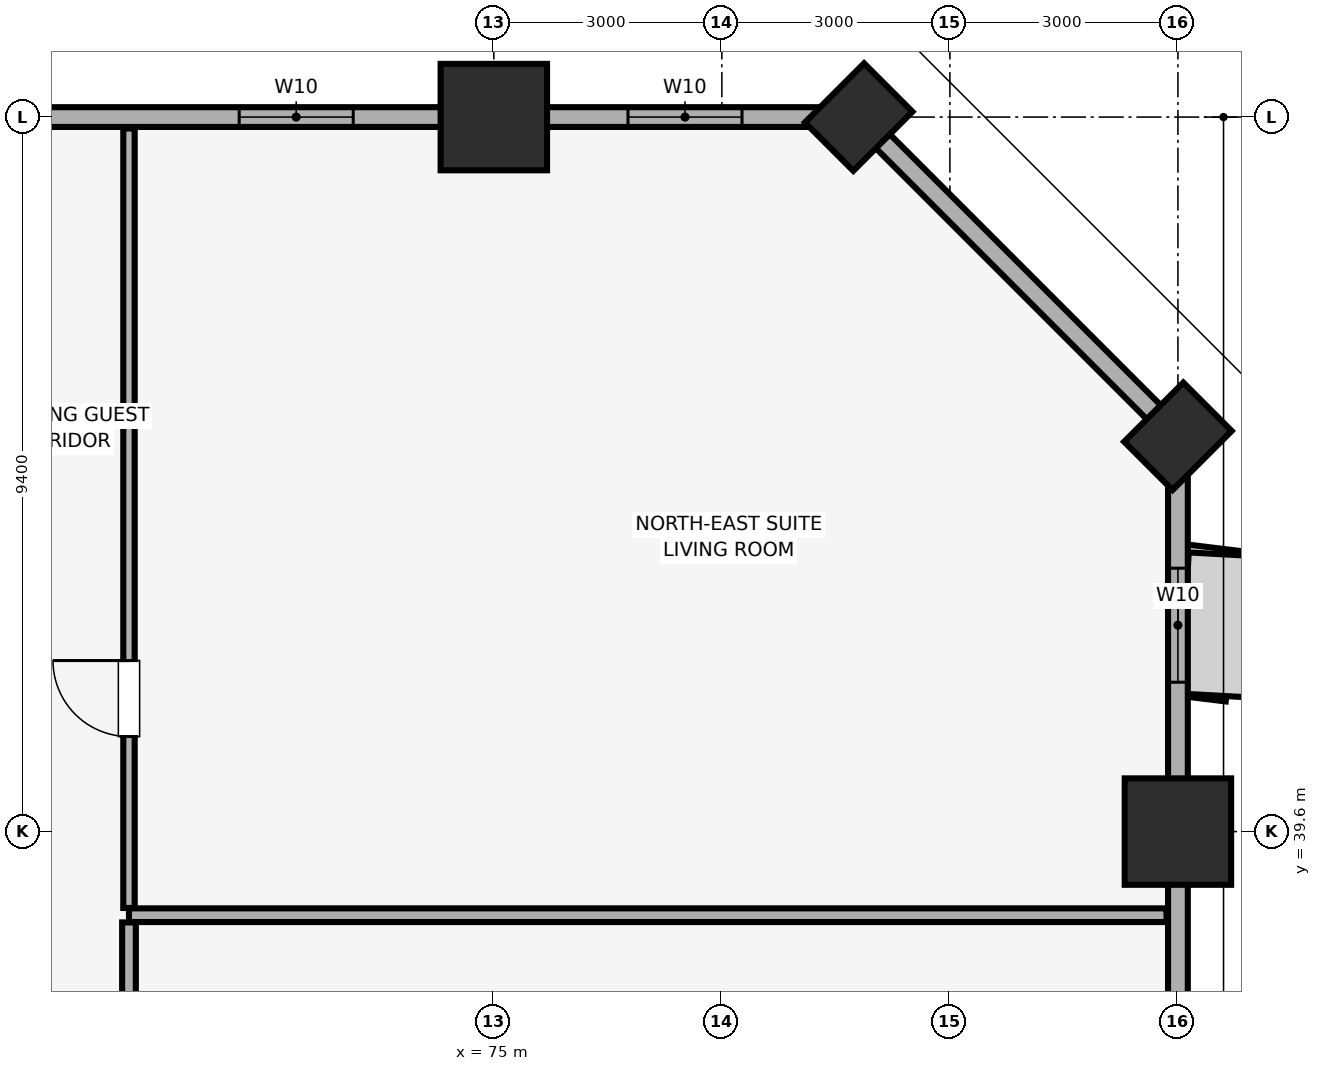
"""IFC4 building model, lengths in metres.
Left out: names, types, materials, properties, quantities, classifications, styles, units other than length and angle.
Written with IfcOpenShell. Run it as: python <this file> out.ifc"""

import sys

from ifc_helpers import new_model, si_unit, direction, frame, frame_2d, origin, origin_2d, place, context, subcontext, project, spatial, rectangle, extrude, element, fill, save


model = new_model("IFC4")
c1 = context("Model", 3, precision=1e-05, world=origin(), true_north=direction((0.0, 1.0)))
c2 = subcontext(c1, "Body", "Model", "MODEL_VIEW")
j1 = project(units=[si_unit("LENGTHUNIT", "METRE"), si_unit("PLANEANGLEUNIT", "RADIAN")], contexts=[c1])
p1 = place(None, origin())
s1 = spatial("IfcSite", under=j1, at=p1, CompositionType="ELEMENT")
p2 = place(p1, origin())
s2 = spatial("IfcBuilding", under=s1, at=p2, CompositionType="ELEMENT")
p3 = place(p2, frame((0.0, 0.0, 35.15)))
s3 = spatial("IfcBuildingStorey", under=s2, at=p3, CompositionType="ELEMENT", Elevation=35.15)
p4 = place(p3, frame((84.0, 39.6, 0.0), z_axis=(0.0, 0.0, 1.0), x_axis=(1.0, 0.0, 0.0)))
e1 = element("IfcColumn", 1, at=p4, inside=s3, PredefinedType="COLUMN", context=c2, shape_type="SweptSolid", body=[
    extrude(rectangle(XDim=1.4, YDim=1.4, at=origin_2d()), origin(), (0.0, 0.0, 1.0), 3.51),
])
for number, where, z_axis, x_axis in (
    (2, (84.0, 44.8, 0.0), (0.0, 0.0, 1.0), (0.707, 0.707, 0.0)),
    (3, (79.8, 49.0, 0.0), (0.0, 0.0, 1.0), (0.707, 0.707, 0.0)),
):
    element("IfcColumn", number, at=place(p3, frame(where, z_axis=z_axis, x_axis=x_axis)), inside=s3, PredefinedType="PILASTER", context=c2, shape_type="SweptSolid", body=[
        extrude(rectangle(XDim=1.1, YDim=0.9, at=origin_2d()), origin(), (0.0, 0.0, 1.0), 3.51),
    ])
p5 = place(p3, frame((75.0, 49.0, 0.0), z_axis=(0.0, 0.0, 1.0), x_axis=(1.0, 0.0, 0.0)))
e4 = element("IfcColumn", 4, at=p5, inside=s3, PredefinedType="COLUMN", context=c2, shape_type="SweptSolid", body=[
    extrude(rectangle(XDim=1.4, YDim=1.4, at=origin_2d()), origin(), (0.0, 0.0, 1.0), 3.51),
])
p6 = place(p3, frame((84.0, 4.2, 0.0), z_axis=(0.0, 0.0, 1.0), x_axis=(0.0, 1.0, 0.0)))
e5 = element("IfcWall", 5, at=p6, inside=s3, PredefinedType="SOLIDWALL", context=c2, shape_type="SweptSolid", body=[
    extrude(rectangle(XDim=40.6, YDim=0.26, at=frame_2d((20.3, 0.0))), origin(), (0.0, 0.0, 1.0), 2.56),
])
p7 = place(p6, frame((7.675, 0.0, 0.85)))
e6 = element("IfcOpeningElement", 6, at=p7, cuts=e5, PredefinedType="OPENING", context=c2, shape_type="SweptSolid", body=[
    extrude(rectangle(XDim=1.5, YDim=1.4, at=frame_2d((0.75, 0.7))), frame((0.0, 0.14, 0.0), z_axis=(0.0, -1.0, 0.0), x_axis=(1.0, 0.0, 0.0)), (0.0, 0.0, 1.0), 0.28),
])
p8 = place(p6, frame((12.76, 0.0, 0.85)))
e7 = element("IfcOpeningElement", 7, at=p8, cuts=e5, PredefinedType="OPENING", context=c2, shape_type="SweptSolid", body=[
    extrude(rectangle(XDim=1.5, YDim=1.4, at=frame_2d((0.75, 0.7))), frame((0.0, 0.14, 0.0), z_axis=(0.0, -1.0, 0.0), x_axis=(1.0, 0.0, 0.0)), (0.0, 0.0, 1.0), 0.28),
])
p9 = place(p6, frame((19.56, 0.0, 0.85)))
e8 = element("IfcOpeningElement", 8, at=p9, cuts=e5, PredefinedType="OPENING", context=c2, shape_type="SweptSolid", body=[
    extrude(rectangle(XDim=1.5, YDim=1.4, at=frame_2d((0.75, 0.7))), frame((0.0, 0.14, 0.0), z_axis=(0.0, -1.0, 0.0), x_axis=(1.0, 0.0, 0.0)), (0.0, 0.0, 1.0), 0.28),
])
p10 = place(p6, frame((29.2, 0.0, 0.85)))
e9 = element("IfcOpeningElement", 9, at=p10, cuts=e5, PredefinedType="OPENING", context=c2, shape_type="SweptSolid", body=[
    extrude(rectangle(XDim=1.5, YDim=1.4, at=frame_2d((0.75, 0.7))), frame((0.0, 0.14, 0.0), z_axis=(0.0, -1.0, 0.0), x_axis=(1.0, 0.0, 0.0)), (0.0, 0.0, 1.0), 0.28),
])
p11 = place(p6, frame((37.365, 0.0, 0.85)))
e10 = element("IfcOpeningElement", 10, at=p11, cuts=e5, PredefinedType="OPENING", context=c2, shape_type="SweptSolid", body=[
    extrude(rectangle(XDim=1.5, YDim=1.4, at=frame_2d((0.75, 0.7))), frame((0.0, 0.14, 0.0), z_axis=(0.0, -1.0, 0.0), x_axis=(1.0, 0.0, 0.0)), (0.0, 0.0, 1.0), 0.28),
])
p12 = place(p3, frame((84.0, 44.8, 0.0), z_axis=(0.0, 0.0, 1.0), x_axis=(-0.707106781187, 0.707106781187, 0.0)))
e11 = element("IfcWall", 11, at=p12, inside=s3, PredefinedType="SOLIDWALL", context=c2, shape_type="SweptSolid", body=[
    extrude(rectangle(XDim=5.94, YDim=0.26, at=frame_2d((2.97, 0.0))), origin(), (0.0, 0.0, 1.0), 2.56),
])
p13 = place(p3, frame((79.8, 49.0, 0.0), z_axis=(0.0, 0.0, 1.0), x_axis=(-1.0, 0.0, 0.0)))
e12 = element("IfcWall", 12, at=p13, inside=s3, PredefinedType="SOLIDWALL", context=c2, shape_type="SweptSolid", body=[
    extrude(rectangle(XDim=75.6, YDim=0.26, at=frame_2d((37.8, 0.0))), origin(), (0.0, 0.0, 1.0), 2.56),
])
p14 = place(p13, frame((72.565, 0.0, 0.85)))
e13 = element("IfcOpeningElement", 13, at=p14, cuts=e12, PredefinedType="OPENING", context=c2, shape_type="SweptSolid", body=[
    extrude(rectangle(XDim=1.5, YDim=1.4, at=frame_2d((0.75, 0.7))), frame((0.0, 0.14, 0.0), z_axis=(0.0, -1.0, 0.0), x_axis=(1.0, 0.0, 0.0)), (0.0, 0.0, 1.0), 0.28),
])
p15 = place(p13, frame((67.45, 0.0, 0.85)))
e14 = element("IfcOpeningElement", 14, at=p15, cuts=e12, PredefinedType="OPENING", context=c2, shape_type="SweptSolid", body=[
    extrude(rectangle(XDim=1.5, YDim=1.4, at=frame_2d((0.75, 0.7))), frame((0.0, 0.14, 0.0), z_axis=(0.0, -1.0, 0.0), x_axis=(1.0, 0.0, 0.0)), (0.0, 0.0, 1.0), 0.28),
])
p16 = place(p13, frame((6.65, 0.0, 0.85)))
e15 = element("IfcOpeningElement", 15, at=p16, cuts=e12, PredefinedType="OPENING", context=c2, shape_type="SweptSolid", body=[
    extrude(rectangle(XDim=1.5, YDim=1.4, at=frame_2d((0.75, 0.7))), frame((0.0, 0.14, 0.0), z_axis=(0.0, -1.0, 0.0), x_axis=(1.0, 0.0, 0.0)), (0.0, 0.0, 1.0), 0.28),
])
p17 = place(p13, frame((1.535, 0.0, 0.85)))
e16 = element("IfcOpeningElement", 16, at=p17, cuts=e12, PredefinedType="OPENING", context=c2, shape_type="SweptSolid", body=[
    extrude(rectangle(XDim=1.5, YDim=1.4, at=frame_2d((0.75, 0.7))), frame((0.0, 0.14, 0.0), z_axis=(0.0, -1.0, 0.0), x_axis=(1.0, 0.0, 0.0)), (0.0, 0.0, 1.0), 0.28),
])
p18 = place(p13, frame((51.365, 0.0, 0.9)))
e17 = element("IfcOpeningElement", 17, at=p18, cuts=e12, PredefinedType="OPENING", context=c2, shape_type="SweptSolid", body=[
    extrude(rectangle(XDim=1.5, YDim=1.4, at=frame_2d((0.75, 0.7))), frame((0.0, 0.14, 0.0), z_axis=(0.0, -1.0, 0.0), x_axis=(1.0, 0.0, 0.0)), (0.0, 0.0, 1.0), 0.28),
])
p19 = place(p13, frame((46.0, 0.0, 0.9)))
e18 = element("IfcOpeningElement", 18, at=p19, cuts=e12, PredefinedType="OPENING", context=c2, shape_type="SweptSolid", body=[
    extrude(rectangle(XDim=1.5, YDim=1.4, at=frame_2d((0.75, 0.7))), frame((0.0, 0.14, 0.0), z_axis=(0.0, -1.0, 0.0), x_axis=(1.0, 0.0, 0.0)), (0.0, 0.0, 1.0), 0.28),
])
p20 = place(p13, frame((29.15, 0.0, 0.9)))
e19 = element("IfcOpeningElement", 19, at=p20, cuts=e12, PredefinedType="OPENING", context=c2, shape_type="SweptSolid", body=[
    extrude(rectangle(XDim=1.5, YDim=1.4, at=frame_2d((0.75, 0.7))), frame((0.0, 0.14, 0.0), z_axis=(0.0, -1.0, 0.0), x_axis=(1.0, 0.0, 0.0)), (0.0, 0.0, 1.0), 0.28),
])
p21 = place(p13, frame((23.485, 0.0, 0.9)))
e20 = element("IfcOpeningElement", 20, at=p21, cuts=e12, PredefinedType="OPENING", context=c2, shape_type="SweptSolid", body=[
    extrude(rectangle(XDim=1.5, YDim=1.4, at=frame_2d((0.75, 0.7))), frame((0.0, 0.14, 0.0), z_axis=(0.0, -1.0, 0.0), x_axis=(1.0, 0.0, 0.0)), (0.0, 0.0, 1.0), 0.28),
])
p22 = place(p3, frame((70.2, 38.5, 0.0), z_axis=(0.0, 0.0, 1.0), x_axis=(1.0, 0.0, 0.0)))
e21 = element("IfcWall", 21, at=p22, inside=s3, PredefinedType="PARTITIONING", context=c2, shape_type="SweptSolid", body=[
    extrude(rectangle(XDim=13.65, YDim=0.18, at=frame_2d((6.825, 0.0))), origin(), (0.0, 0.0, 1.0), 3.51),
])
p23 = place(p3, frame((70.2, 29.495, 0.0), z_axis=(0.0, 0.0, 1.0), x_axis=(0.0, 1.0, 0.0)))
e22 = element("IfcWall", 22, at=p23, inside=s3, PredefinedType="PARTITIONING", context=c2, shape_type="SweptSolid", body=[
    extrude(rectangle(XDim=8.91, YDim=0.18, at=frame_2d((4.455, 0.0))), origin(), (0.0, 0.0, 1.0), 3.51),
])
p24 = place(p23, frame((5.59, 0.0, 0.0)))
e23 = element("IfcOpeningElement", 23, at=p24, cuts=e22, PredefinedType="OPENING", context=c2, shape_type="SweptSolid", body=[
    extrude(rectangle(XDim=1.0, YDim=2.15, at=frame_2d((0.5, 1.075))), frame((0.0, 0.1, 0.0), z_axis=(0.0, -1.0, 0.0), x_axis=(1.0, 0.0, 0.0)), (0.0, 0.0, 1.0), 0.2),
])
p25 = place(p3, frame((70.2, 38.595, 0.0), z_axis=(0.0, 0.0, 1.0), x_axis=(0.0, 1.0, 0.0)))
e24 = element("IfcWall", 24, at=p25, inside=s3, PredefinedType="PARTITIONING", context=c2, shape_type="SweptSolid", body=[
    extrude(rectangle(XDim=10.255, YDim=0.15, at=frame_2d((5.127, 0.0))), origin(), (0.0, 0.0, 1.0), 3.51),
])
p26 = place(p25, frame((2.255, 0.0, 0.0)))
e25 = element("IfcOpeningElement", 25, at=p26, cuts=e24, PredefinedType="OPENING", context=c2, shape_type="SweptSolid", body=[
    extrude(rectangle(XDim=1.0, YDim=2.15, at=frame_2d((0.5, 1.075))), frame((0.0, 0.085, 0.0), z_axis=(0.0, -1.0, 0.0), x_axis=(1.0, 0.0, 0.0)), (0.0, 0.0, 1.0), 0.17),
])
p27 = place(p11, origin())
e26 = element("IfcWindow", 26, at=p27, inside=s3, PartitioningType="SINGLE_PANEL", PredefinedType="WINDOW", context=c2, shape_type="SweptSolid", body=[
    extrude(rectangle(XDim=1.5, YDim=1.4, at=frame_2d((0.75, 0.7))), frame((0.0, 0.03, 0.0), z_axis=(0.0, -1.0, 0.0), x_axis=(1.0, 0.0, 0.0)), (0.0, 0.0, 1.0), 0.06),
])
fill(e10, e26)
p28 = place(p16, origin())
e27 = element("IfcWindow", 27, at=p28, inside=s3, PartitioningType="SINGLE_PANEL", PredefinedType="WINDOW", context=c2, shape_type="SweptSolid", body=[
    extrude(rectangle(XDim=1.5, YDim=1.4, at=frame_2d((0.75, 0.7))), frame((0.0, 0.03, 0.0), z_axis=(0.0, -1.0, 0.0), x_axis=(1.0, 0.0, 0.0)), (0.0, 0.0, 1.0), 0.06),
])
fill(e15, e27)
p29 = place(p17, origin())
e28 = element("IfcWindow", 28, at=p29, inside=s3, PartitioningType="SINGLE_PANEL", PredefinedType="WINDOW", context=c2, shape_type="SweptSolid", body=[
    extrude(rectangle(XDim=1.5, YDim=1.4, at=frame_2d((0.75, 0.7))), frame((0.0, 0.03, 0.0), z_axis=(0.0, -1.0, 0.0), x_axis=(1.0, 0.0, 0.0)), (0.0, 0.0, 1.0), 0.06),
])
fill(e16, e28)
p30 = place(p26, origin())
e29 = element("IfcDoor", 29, at=p30, inside=s3, OperationType="SINGLE_SWING_RIGHT", PredefinedType="DOOR", context=c2, shape_type="SweptSolid", body=[
    extrude(rectangle(XDim=1.0, YDim=2.15, at=frame_2d((0.5, 1.075))), frame((0.0, 0.025, 0.0), z_axis=(0.0, -1.0, 0.0), x_axis=(1.0, 0.0, 0.0)), (0.0, 0.0, 1.0), 0.05),
])
fill(e25, e29)
save(model, sys.argv[1])
